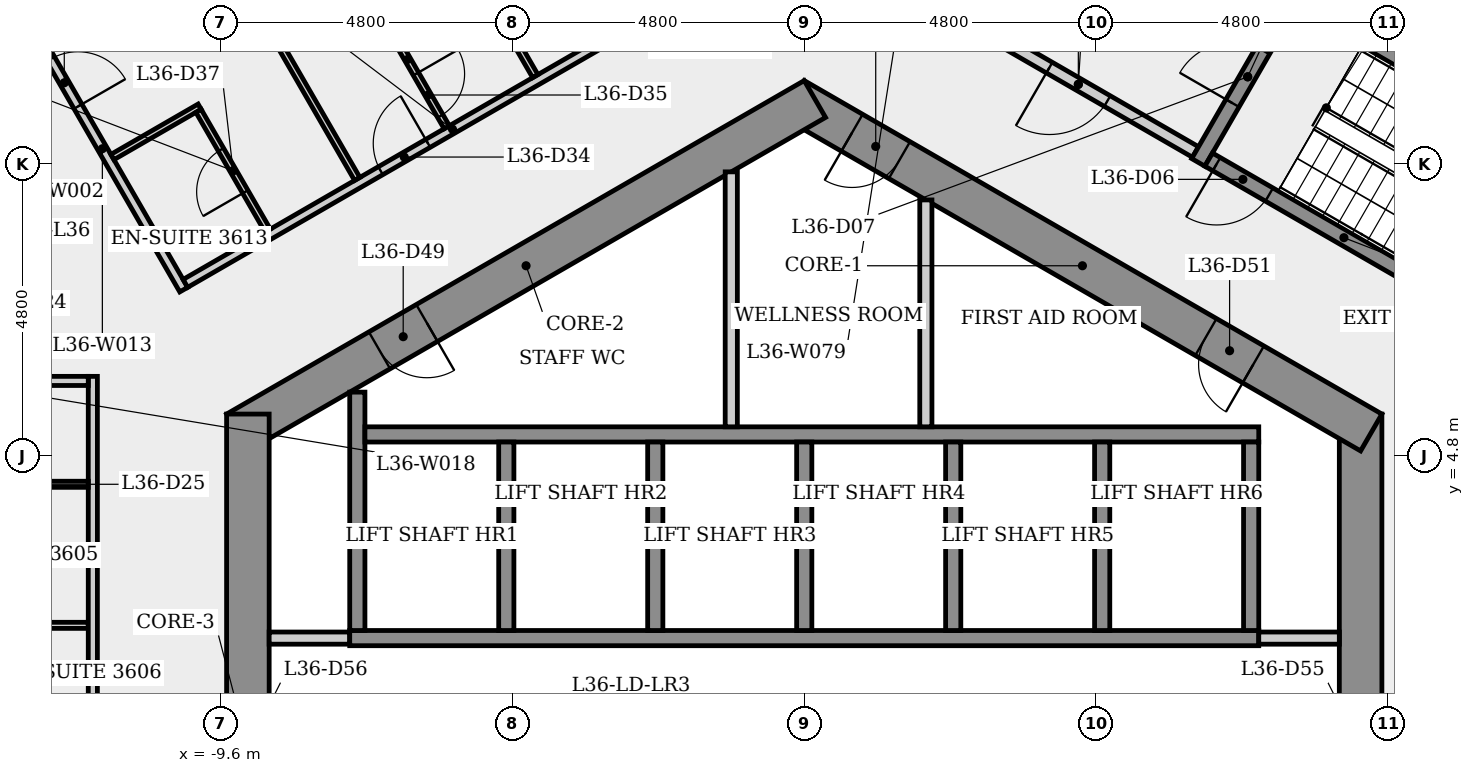
"""IFC4 building model, lengths in metres.
Left out: names, types, materials, properties, quantities, classifications, styles, units other than length and angle.
Written with IfcOpenShell. Run it as: python <this file> out.ifc"""

import sys

from ifc_helpers import new_model, si_unit, direction, frame, frame_2d, origin, place, context, subcontext, project, spatial, rectangle, extrude, element, fill, save


model = new_model("IFC4")
c1 = context("Model", 3, precision=1e-05, world=origin(), true_north=direction((0.0, 1.0)))
c2 = subcontext(c1, "Body", "Model", "MODEL_VIEW")
j1 = project(units=[si_unit("LENGTHUNIT", "METRE"), si_unit("PLANEANGLEUNIT", "RADIAN")], contexts=[c1])
p1 = place(None, origin())
s1 = spatial("IfcSite", under=j1, at=p1, CompositionType="ELEMENT")
p2 = place(p1, origin())
s2 = spatial("IfcBuilding", under=s1, at=p2, CompositionType="ELEMENT")
p3 = place(p2, frame((0.0, 0.0, 135.9)))
s3 = spatial("IfcBuildingStorey", under=s2, at=p3, CompositionType="ELEMENT", Elevation=135.9)
p4 = place(p3, frame((9.15, -5.485, 0.0), z_axis=(0.0, 0.0, 1.0), x_axis=(0.0, 1.0, 0.0)))
e1 = element("IfcWall", 1, at=p4, inside=s3, PredefinedType="SHEAR", context=c2, shape_type="SweptSolid", body=[
    extrude(rectangle(XDim=10.97, YDim=0.7, at=frame_2d((5.485, 0.0))), origin(), (0.0, 0.0, 1.0), 4.0),
])
p5 = place(p4, frame((4.685, 0.0, 0.0)))
e2 = element("IfcOpeningElement", 2, at=p5, cuts=e1, PredefinedType="OPENING", context=c2, shape_type="SweptSolid", body=[
    extrude(rectangle(XDim=1.6, YDim=2.1, at=frame_2d((0.8, 1.05))), frame((0.0, 0.36, 0.0), z_axis=(0.0, -1.0, 0.0), x_axis=(1.0, 0.0, 0.0)), (0.0, 0.0, 1.0), 0.72),
])
p6 = place(p3, frame((9.325, 5.182, 0.0), z_axis=(0.0, 0.0, 1.0), x_axis=(-0.866023993627, 0.500002442456, 0.0)))
e3 = element("IfcWall", 3, at=p6, inside=s3, PredefinedType="SHEAR", context=c2, shape_type="SweptSolid", body=[
    extrude(rectangle(XDim=10.97, YDim=0.7, at=frame_2d((5.485, 0.0))), origin(), (0.0, 0.0, 1.0), 4.0),
])
p7 = place(p6, frame((8.96, 0.0, 0.0)))
e4 = element("IfcOpeningElement", 4, at=p7, cuts=e3, PredefinedType="OPENING", context=c2, shape_type="SweptSolid", body=[
    extrude(rectangle(XDim=0.9, YDim=2.1, at=frame_2d((0.45, 1.05))), frame((0.0, 0.36, 0.0), z_axis=(0.0, -1.0, 0.0), x_axis=(1.0, 0.0, 0.0)), (0.0, 0.0, 1.0), 0.72),
])
p8 = place(p6, frame((2.24, 0.0, 0.0)))
e5 = element("IfcOpeningElement", 5, at=p8, cuts=e3, PredefinedType="OPENING", context=c2, shape_type="SweptSolid", body=[
    extrude(rectangle(XDim=0.9, YDim=2.1, at=frame_2d((0.45, 1.05))), frame((0.0, 0.36, 0.0), z_axis=(0.0, -1.0, 0.0), x_axis=(1.0, 0.0, 0.0)), (0.0, 0.0, 1.0), 0.72),
])
p9 = place(p3, frame((0.175, 10.667, 0.0), z_axis=(0.0, 0.0, 1.0), x_axis=(-0.866023993627, -0.500002442456, 0.0)))
e6 = element("IfcWall", 6, at=p9, inside=s3, PredefinedType="SHEAR", context=c2, shape_type="SweptSolid", body=[
    extrude(rectangle(XDim=10.97, YDim=0.7, at=frame_2d((5.485, 0.0))), origin(), (0.0, 0.0, 1.0), 4.0),
])
p10 = place(p9, frame((7.368, 0.0, 0.0)))
e7 = element("IfcOpeningElement", 7, at=p10, cuts=e6, PredefinedType="OPENING", context=c2, shape_type="SweptSolid", body=[
    extrude(rectangle(XDim=0.9, YDim=2.1, at=frame_2d((0.45, 1.05))), frame((0.0, 0.36, 0.0), z_axis=(0.0, -1.0, 0.0), x_axis=(1.0, 0.0, 0.0)), (0.0, 0.0, 1.0), 0.72),
])
p11 = place(p3, frame((-9.15, 5.485, 0.0), z_axis=(0.0, 0.0, 1.0), x_axis=(0.0, -1.0, 0.0)))
e8 = element("IfcWall", 8, at=p11, inside=s3, PredefinedType="SHEAR", context=c2, shape_type="SweptSolid", body=[
    extrude(rectangle(XDim=10.97, YDim=0.7, at=frame_2d((5.485, 0.0))), origin(), (0.0, 0.0, 1.0), 4.0),
])
p12 = place(p11, frame((4.685, 0.0, 0.0)))
e9 = element("IfcOpeningElement", 9, at=p12, cuts=e8, PredefinedType="OPENING", context=c2, shape_type="SweptSolid", body=[
    extrude(rectangle(XDim=1.6, YDim=2.1, at=frame_2d((0.8, 1.05))), frame((0.0, 0.36, 0.0), z_axis=(0.0, -1.0, 0.0), x_axis=(1.0, 0.0, 0.0)), (0.0, 0.0, 1.0), 0.72),
])
p13 = place(p3, frame((-18.564, 2.01, 0.0), z_axis=(0.0, 0.0, 1.0), x_axis=(1.0, 0.0, 0.0)))
e10 = element("IfcWall", 10, at=p13, inside=s3, PredefinedType="PARTITIONING", context=c2, shape_type="SweptSolid", body=[
    extrude(rectangle(XDim=6.789, YDim=0.1, at=frame_2d((3.395, 0.0))), origin(), (0.0, 0.0, 1.0), 3.6),
])
p14 = place(p3, frame((-12.881, 12.167, 0.0), z_axis=(0.0, 0.0, 1.0), x_axis=(0.500034386872, -0.866005549604, 0.0)))
e11 = element("IfcWall", 11, at=p14, inside=s3, PredefinedType="PARTITIONING", context=c2, shape_type="SweptSolid", body=[
    extrude(rectangle(XDim=5.352, YDim=0.15, at=frame_2d((2.676, 0.0))), origin(), (0.0, 0.0, 1.0), 3.6),
])
p15 = place(p14, frame((0.974, 0.0, 0.0)))
e12 = element("IfcOpeningElement", 12, at=p15, cuts=e11, PredefinedType="OPENING", context=c2, shape_type="SweptSolid", body=[
    extrude(rectangle(XDim=0.9, YDim=2.1, at=frame_2d((0.45, 1.05))), frame((0.0, 0.085, 0.0), z_axis=(0.0, -1.0, 0.0), x_axis=(1.0, 0.0, 0.0)), (0.0, 0.0, 1.0), 0.17),
])
p16 = place(p3, frame((-11.7, 6.105, 0.0), z_axis=(0.0, 0.0, 1.0), x_axis=(0.0, -1.0, 0.0)))
e13 = element("IfcWall", 13, at=p16, inside=s3, PredefinedType="PARTITIONING", context=c2, shape_type="SweptSolid", body=[
    extrude(rectangle(XDim=12.135, YDim=0.15, at=frame_2d((6.067, 0.0))), origin(), (0.0, 0.0, 1.0), 3.6),
])
p17 = place(p16, frame((6.815, 0.0, 0.0)))
e14 = element("IfcOpeningElement", 14, at=p17, cuts=e13, PredefinedType="OPENING", context=c2, shape_type="SweptSolid", body=[
    extrude(rectangle(XDim=0.9, YDim=2.1, at=frame_2d((0.45, 1.05))), frame((0.0, 0.085, 0.0), z_axis=(0.0, -1.0, 0.0), x_axis=(1.0, 0.0, 0.0)), (0.0, 0.0, 1.0), 0.17),
])
p18 = place(p3, frame((-11.775, 4.33, 0.0), z_axis=(0.0, 0.0, 1.0), x_axis=(-1.0, 0.0, 0.0)))
e15 = element("IfcWall", 15, at=p18, inside=s3, PredefinedType="PARTITIONING", context=c2, shape_type="SweptSolid", body=[
    extrude(rectangle(XDim=2.275, YDim=0.1, at=frame_2d((1.138, 0.0))), origin(), (0.0, 0.0, 1.0), 3.6),
])
p19 = place(p18, frame((0.738, 0.0, 0.0)))
e16 = element("IfcOpeningElement", 16, at=p19, cuts=e15, PredefinedType="OPENING", context=c2, shape_type="SweptSolid", body=[
    extrude(rectangle(XDim=0.8, YDim=2.1, at=frame_2d((0.4, 1.05))), frame((0.0, 0.06, 0.0), z_axis=(0.0, -1.0, 0.0), x_axis=(1.0, 0.0, 0.0)), (0.0, 0.0, 1.0), 0.12),
])
p20 = place(p3, frame((-11.775, 6.03, 0.0), z_axis=(0.0, 0.0, 1.0), x_axis=(-1.0, 0.0, 0.0)))
e17 = element("IfcWall", 17, at=p20, inside=s3, PredefinedType="PARTITIONING", context=c2, shape_type="SweptSolid", body=[
    extrude(rectangle(XDim=4.649, YDim=0.15, at=frame_2d((2.325, 0.0))), origin(), (0.0, 0.0, 1.0), 3.6),
])
p21 = place(p20, frame((1.875, 0.0, 0.0)))
e18 = element("IfcOpeningElement", 18, at=p21, cuts=e17, PredefinedType="OPENING", context=c2, shape_type="SweptSolid", body=[
    extrude(rectangle(XDim=0.9, YDim=2.1, at=frame_2d((0.45, 1.05))), frame((0.0, 0.085, 0.0), z_axis=(0.0, -1.0, 0.0), x_axis=(1.0, 0.0, 0.0)), (0.0, 0.0, 1.0), 0.17),
])
p22 = place(p3, frame((-10.178, 7.634, 0.0), z_axis=(0.0, 0.0, 1.0), x_axis=(0.866024876865, 0.500000912651, 0.0)))
e19 = element("IfcWall", 19, at=p22, inside=s3, PredefinedType="PARTITIONING", context=c2, shape_type="SweptSolid", body=[
    extrude(rectangle(XDim=10.145, YDim=0.15, at=frame_2d((5.072, 0.0))), origin(), (0.0, 0.0, 1.0), 3.6),
])
p23 = place(p22, frame((3.707, 0.0, 0.0)))
e20 = element("IfcOpeningElement", 20, at=p23, cuts=e19, PredefinedType="OPENING", context=c2, shape_type="SweptSolid", body=[
    extrude(rectangle(XDim=0.9, YDim=2.1, at=frame_2d((0.45, 1.05))), frame((0.0, 0.085, 0.0), z_axis=(0.0, -1.0, 0.0), x_axis=(1.0, 0.0, 0.0)), (0.0, 0.0, 1.0), 0.17),
])
p24 = place(p3, frame((-9.943, 10.541, 0.0), z_axis=(0.0, 0.0, 1.0), x_axis=(-0.866057962423, -0.499943602543, 0.0)))
e21 = element("IfcWall", 21, at=p24, inside=s3, PredefinedType="PARTITIONING", context=c2, shape_type="SweptSolid", body=[
    extrude(rectangle(XDim=1.656, YDim=0.1, at=frame_2d((0.828, 0.0))), origin(), (0.0, 0.0, 1.0), 3.6),
])
p25 = place(p3, frame((-8.8, 1.8, 0.0), z_axis=(0.0, 0.0, 1.0), x_axis=(1.0, 0.0, 0.0)))
e22 = element("IfcWall", 22, at=p25, inside=s3, PredefinedType="PARTITIONING", context=c2, shape_type="SweptSolid", body=[
    extrude(rectangle(XDim=1.325, YDim=0.2, at=frame_2d((0.663, 0.0))), origin(), (0.0, 0.0, 1.0), 3.6),
])
p26 = place(p3, frame((-8.824, 8.502, 0.0), z_axis=(0.0, 0.0, 1.0), x_axis=(-0.499982560684, 0.866035472144, 0.0)))
e23 = element("IfcWall", 23, at=p26, inside=s3, PredefinedType="PARTITIONING", context=c2, shape_type="SweptSolid", body=[
    extrude(rectangle(XDim=2.275, YDim=0.1, at=frame_2d((1.137, 0.0))), origin(), (0.0, 0.0, 1.0), 3.6),
])
p27 = place(p26, frame((0.738, 0.0, 0.0)))
e24 = element("IfcOpeningElement", 24, at=p27, cuts=e23, PredefinedType="OPENING", context=c2, shape_type="SweptSolid", body=[
    extrude(rectangle(XDim=0.8, YDim=2.1, at=frame_2d((0.4, 1.05))), frame((0.0, 0.06, 0.0), z_axis=(0.0, -1.0, 0.0), x_axis=(1.0, 0.0, 0.0)), (0.0, 0.0, 1.0), 0.12),
])
p28 = place(p3, frame((-7.475, 1.8, 0.0), z_axis=(0.0, 0.0, 1.0), x_axis=(1.0, 0.0, 0.0)))
e25 = element("IfcWall", 25, at=p28, inside=s3, PredefinedType="SHEAR", context=c2, shape_type="SweptSolid", body=[
    extrude(rectangle(XDim=14.95, YDim=0.25, at=frame_2d((7.475, 0.0))), origin(), (0.0, 0.0, 1.0), 3.6),
])
p29 = place(p3, frame((-7.35, 1.925, 0.0), z_axis=(0.0, 0.0, 1.0), x_axis=(0.0, 1.0, 0.0)))
e26 = element("IfcWall", 26, at=p29, inside=s3, PredefinedType="SHEAR", context=c2, shape_type="SweptSolid", body=[
    extrude(rectangle(XDim=3.921, YDim=0.25, at=frame_2d((1.96, 0.0))), origin(), (0.0, 0.0, 1.0), 3.6),
])
p30 = place(p3, frame((-7.225, 5.15, 0.0), z_axis=(0.0, 0.0, 1.0), x_axis=(1.0, 0.0, 0.0)))
e27 = element("IfcWall", 27, at=p30, inside=s3, PredefinedType="SHEAR", context=c2, shape_type="SweptSolid", body=[
    extrude(rectangle(XDim=14.7, YDim=0.25, at=frame_2d((7.35, 0.0))), origin(), (0.0, 0.0, 1.0), 3.6),
])
p31 = place(p3, frame((-7.352, 9.352, 0.0), z_axis=(0.0, 0.0, 1.0), x_axis=(-0.499997453958, 0.866026873738, 0.0)))
e28 = element("IfcWall", 28, at=p31, inside=s3, PredefinedType="PARTITIONING", context=c2, shape_type="SweptSolid", body=[
    extrude(rectangle(XDim=7.71, YDim=0.1, at=frame_2d((3.855, 0.0))), origin(), (0.0, 0.0, 1.0), 3.6),
])
p32 = place(p3, frame((-7.167, 12.432, 0.0), z_axis=(0.0, 0.0, 1.0), x_axis=(0.500034319456, -0.866005588531, 0.0)))
e29 = element("IfcWall", 29, at=p32, inside=s3, PredefinedType="PARTITIONING", context=c2, shape_type="SweptSolid", body=[
    extrude(rectangle(XDim=2.575, YDim=0.1, at=frame_2d((1.288, 0.0))), origin(), (0.0, 0.0, 1.0), 3.6),
])
p33 = place(p32, frame((1.562, 0.0, 0.0)))
e30 = element("IfcOpeningElement", 30, at=p33, cuts=e29, PredefinedType="OPENING", context=c2, shape_type="SweptSolid", body=[
    extrude(rectangle(XDim=0.8, YDim=2.1, at=frame_2d((0.4, 1.05))), frame((0.0, 0.06, 0.0), z_axis=(0.0, -1.0, 0.0), x_axis=(1.0, 0.0, 0.0)), (0.0, 0.0, 1.0), 0.12),
])
p34 = place(p3, frame((-4.9, 5.025, 0.0), z_axis=(0.0, 0.0, 1.0), x_axis=(0.0, -1.0, 0.0)))
e31 = element("IfcWall", 31, at=p34, inside=s3, PredefinedType="SHEAR", context=c2, shape_type="SweptSolid", body=[
    extrude(rectangle(XDim=3.1, YDim=0.25, at=frame_2d((1.55, 0.0))), origin(), (0.0, 0.0, 1.0), 4.0),
])
p35 = place(p3, frame((-4.423, 11.043, 0.0), z_axis=(0.0, 0.0, 1.0), x_axis=(-0.499983743644, 0.866034789193, 0.0)))
e32 = element("IfcWall", 32, at=p35, inside=s3, PredefinedType="PARTITIONING", context=c2, shape_type="SweptSolid", body=[
    extrude(rectangle(XDim=7.711, YDim=0.1, at=frame_2d((3.855, 0.0))), origin(), (0.0, 0.0, 1.0), 3.6),
])
p36 = place(p3, frame((-2.45, 5.025, 0.0), z_axis=(0.0, 0.0, 1.0), x_axis=(0.0, -1.0, 0.0)))
e33 = element("IfcWall", 33, at=p36, inside=s3, PredefinedType="SHEAR", context=c2, shape_type="SweptSolid", body=[
    extrude(rectangle(XDim=3.1, YDim=0.25, at=frame_2d((1.55, 0.0))), origin(), (0.0, 0.0, 1.0), 4.0),
])
p37 = place(p3, frame((-1.2, 9.469, 0.0), z_axis=(0.0, 0.0, 1.0), x_axis=(0.0, -1.0, 0.0)))
e34 = element("IfcWall", 34, at=p37, inside=s3, PredefinedType="PARTITIONING", context=c2, shape_type="SweptSolid", body=[
    extrude(rectangle(XDim=4.194, YDim=0.2, at=frame_2d((2.097, 0.0))), origin(), (0.0, 0.0, 1.0), 3.6),
])
p38 = place(p3, frame((0.0, 5.025, 0.0), z_axis=(0.0, 0.0, 1.0), x_axis=(0.0, -1.0, 0.0)))
e35 = element("IfcWall", 35, at=p38, inside=s3, PredefinedType="SHEAR", context=c2, shape_type="SweptSolid", body=[
    extrude(rectangle(XDim=3.1, YDim=0.25, at=frame_2d((1.55, 0.0))), origin(), (0.0, 0.0, 1.0), 4.0),
])
p39 = place(p3, frame((2.0, 9.007, 0.0), z_axis=(0.0, 0.0, 1.0), x_axis=(0.0, -1.0, 0.0)))
e36 = element("IfcWall", 36, at=p39, inside=s3, PredefinedType="PARTITIONING", context=c2, shape_type="SweptSolid", body=[
    extrude(rectangle(XDim=3.732, YDim=0.2, at=frame_2d((1.866, 0.0))), origin(), (0.0, 0.0, 1.0), 3.6),
])
for number, where, z_axis, x_axis in (
    (37, (2.45, 5.025, 0.0), (0.0, 0.0, 1.0), (0.0, -1.0, 0.0)),
    (38, (4.9, 5.025, 0.0), (0.0, 0.0, 1.0), (0.0, -1.0, 0.0)),
):
    element("IfcWall", number, at=place(p3, frame(where, z_axis=z_axis, x_axis=x_axis)), inside=s3, PredefinedType="SHEAR", context=c2, shape_type="SweptSolid", body=[
        extrude(rectangle(XDim=3.1, YDim=0.25, at=frame_2d((1.55, 0.0))), origin(), (0.0, 0.0, 1.0), 4.0),
    ])
p40 = place(p3, frame((6.435, 9.795, 0.0), z_axis=(0.0, 0.0, 1.0), x_axis=(-0.866012907634, 0.500021643343, 0.0)))
e39 = element("IfcWall", 39, at=p40, inside=s3, PredefinedType="PARTITIONING", context=c2, shape_type="SweptSolid", body=[
    extrude(rectangle(XDim=4.45, YDim=0.2, at=frame_2d((2.225, 0.0))), origin(), (0.0, 0.0, 1.0), 3.6),
])
p41 = place(p40, frame((1.675, 0.0, 0.0)))
e40 = element("IfcOpeningElement", 40, at=p41, cuts=e39, PredefinedType="OPENING", context=c2, shape_type="SweptSolid", body=[
    extrude(rectangle(XDim=1.1, YDim=2.1, at=frame_2d((0.55, 1.05))), frame((0.0, 0.11, 0.0), z_axis=(0.0, -1.0, 0.0), x_axis=(1.0, 0.0, 0.0)), (0.0, 0.0, 1.0), 0.22),
])
p42 = place(p3, frame((6.48, 9.624, 0.0), z_axis=(0.0, 0.0, 1.0), x_axis=(0.500017246033, 0.866015446554, 0.0)))
e41 = element("IfcWall", 41, at=p42, inside=s3, PredefinedType="SHEAR", context=c2, shape_type="SweptSolid", body=[
    extrude(rectangle(XDim=3.25, YDim=0.25, at=frame_2d((1.625, 0.0))), origin(), (0.0, 0.0, 1.0), 3.6),
])
p43 = place(p42, frame((1.125, 0.0, 0.0)))
e42 = element("IfcOpeningElement", 42, at=p43, cuts=e41, PredefinedType="OPENING", context=c2, shape_type="SweptSolid", body=[
    extrude(rectangle(XDim=1.0, YDim=2.1, at=frame_2d((0.5, 1.05))), frame((0.0, 0.135, 0.0), z_axis=(0.0, -1.0, 0.0), x_axis=(1.0, 0.0, 0.0)), (0.0, 0.0, 1.0), 0.27),
])
p44 = place(p3, frame((7.475, 1.8, 0.0), z_axis=(0.0, 0.0, 1.0), x_axis=(1.0, 0.0, 0.0)))
e43 = element("IfcWall", 43, at=p44, inside=s3, PredefinedType="PARTITIONING", context=c2, shape_type="SweptSolid", body=[
    extrude(rectangle(XDim=1.325, YDim=0.2, at=frame_2d((0.663, 0.0))), origin(), (0.0, 0.0, 1.0), 3.6),
])
p45 = place(p3, frame((7.35, 5.025, 0.0), z_axis=(0.0, 0.0, 1.0), x_axis=(0.0, -1.0, 0.0)))
e44 = element("IfcWall", 44, at=p45, inside=s3, PredefinedType="SHEAR", context=c2, shape_type="SweptSolid", body=[
    extrude(rectangle(XDim=3.1, YDim=0.25, at=frame_2d((1.55, 0.0))), origin(), (0.0, 0.0, 1.0), 4.0),
])
p46 = place(p3, frame((8.151, 12.268, 0.0), z_axis=(0.0, 0.0, 1.0), x_axis=(0.866025499775, -0.499999833739, 0.0)))
e45 = element("IfcWall", 45, at=p46, inside=s3, PredefinedType="SHEAR", context=c2, shape_type="SweptSolid", body=[
    extrude(rectangle(XDim=6.4, YDim=0.25, at=frame_2d((3.2, 0.0))), origin(), (0.0, 0.0, 1.0), 3.6),
])
p47 = place(p3, frame((11.1, 7.101, 0.0), z_axis=(0.0, 0.0, 1.0), x_axis=(-0.8660265141, 0.499998076872, 0.0)))
e46 = element("IfcWall", 46, at=p47, inside=s3, PredefinedType="SHEAR", context=c2, shape_type="SweptSolid", body=[
    extrude(rectangle(XDim=5.137, YDim=0.25, at=frame_2d((2.569, 0.0))), origin(), (0.0, 0.0, 1.0), 3.6),
])
p48 = place(p47, frame((3.987, 0.0, 0.0)))
e47 = element("IfcOpeningElement", 47, at=p48, cuts=e46, PredefinedType="OPENING", context=c2, shape_type="SweptSolid", body=[
    extrude(rectangle(XDim=1.0, YDim=2.1, at=frame_2d((0.5, 1.05))), frame((0.0, 0.135, 0.0), z_axis=(0.0, -1.0, 0.0), x_axis=(1.0, 0.0, 0.0)), (0.0, 0.0, 1.0), 0.27),
])
p49 = place(p48, origin())
e48 = element("IfcDoor", 48, at=p49, inside=s3, OperationType="SINGLE_SWING_RIGHT", PredefinedType="DOOR", context=c2, shape_type="SweptSolid", body=[
    extrude(rectangle(XDim=1.0, YDim=2.1, at=frame_2d((0.5, 1.05))), frame((0.0, 0.025, 0.0), z_axis=(0.0, -1.0, 0.0), x_axis=(1.0, 0.0, 0.0)), (0.0, 0.0, 1.0), 0.05),
])
fill(e47, e48)
p50 = place(p43, origin())
e49 = element("IfcDoor", 49, at=p50, inside=s3, OperationType="SINGLE_SWING_LEFT", PredefinedType="DOOR", context=c2, shape_type="SweptSolid", body=[
    extrude(rectangle(XDim=1.0, YDim=2.1, at=frame_2d((0.5, 1.05))), frame((0.0, 0.025, 0.0), z_axis=(0.0, -1.0, 0.0), x_axis=(1.0, 0.0, 0.0)), (0.0, 0.0, 1.0), 0.05),
])
fill(e42, e49)
p51 = place(p41, origin())
e50 = element("IfcDoor", 50, at=p51, inside=s3, OperationType="SINGLE_SWING_RIGHT", PredefinedType="DOOR", context=c2, shape_type="SweptSolid", body=[
    extrude(rectangle(XDim=1.1, YDim=2.1, at=frame_2d((0.55, 1.05))), frame((0.0, 0.025, 0.0), z_axis=(0.0, -1.0, 0.0), x_axis=(1.0, 0.0, 0.0)), (0.0, 0.0, 1.0), 0.05),
])
fill(e40, e50)
p52 = place(p23, origin())
e51 = element("IfcDoor", 51, at=p52, inside=s3, OperationType="SINGLE_SWING_RIGHT", PredefinedType="DOOR", context=c2, shape_type="SweptSolid", body=[
    extrude(rectangle(XDim=0.9, YDim=2.1, at=frame_2d((0.45, 1.05))), frame((0.0, 0.025, 0.0), z_axis=(0.0, -1.0, 0.0), x_axis=(1.0, 0.0, 0.0)), (0.0, 0.0, 1.0), 0.05),
])
fill(e20, e51)
p53 = place(p33, origin())
e52 = element("IfcDoor", 52, at=p53, inside=s3, OperationType="SINGLE_SWING_LEFT", PredefinedType="DOOR", context=c2, shape_type="SweptSolid", body=[
    extrude(rectangle(XDim=0.8, YDim=2.1, at=frame_2d((0.4, 1.05))), frame((0.0, 0.025, 0.0), z_axis=(0.0, -1.0, 0.0), x_axis=(1.0, 0.0, 0.0)), (0.0, 0.0, 1.0), 0.05),
])
fill(e30, e52)
p54 = place(p15, origin())
e53 = element("IfcDoor", 53, at=p54, inside=s3, OperationType="SINGLE_SWING_RIGHT", PredefinedType="DOOR", context=c2, shape_type="SweptSolid", body=[
    extrude(rectangle(XDim=0.9, YDim=2.1, at=frame_2d((0.45, 1.05))), frame((0.0, 0.025, 0.0), z_axis=(0.0, -1.0, 0.0), x_axis=(1.0, 0.0, 0.0)), (0.0, 0.0, 1.0), 0.05),
])
fill(e12, e53)
p55 = place(p27, origin())
e54 = element("IfcDoor", 54, at=p55, inside=s3, OperationType="SINGLE_SWING_LEFT", PredefinedType="DOOR", context=c2, shape_type="SweptSolid", body=[
    extrude(rectangle(XDim=0.8, YDim=2.1, at=frame_2d((0.4, 1.05))), frame((0.0, 0.025, 0.0), z_axis=(0.0, -1.0, 0.0), x_axis=(1.0, 0.0, 0.0)), (0.0, 0.0, 1.0), 0.05),
])
fill(e24, e54)
p56 = place(p10, origin())
e55 = element("IfcDoor", 55, at=p56, inside=s3, OperationType="SINGLE_SWING_LEFT", PredefinedType="DOOR", context=c2, shape_type="SweptSolid", body=[
    extrude(rectangle(XDim=0.9, YDim=2.1, at=frame_2d((0.45, 1.05))), frame((0.0, 0.025, 0.0), z_axis=(0.0, -1.0, 0.0), x_axis=(1.0, 0.0, 0.0)), (0.0, 0.0, 1.0), 0.05),
])
fill(e7, e55)
p57 = place(p7, origin())
e56 = element("IfcDoor", 56, at=p57, inside=s3, OperationType="SINGLE_SWING_RIGHT", PredefinedType="DOOR", context=c2, shape_type="SweptSolid", body=[
    extrude(rectangle(XDim=0.9, YDim=2.1, at=frame_2d((0.45, 1.05))), frame((0.0, 0.025, 0.0), z_axis=(0.0, -1.0, 0.0), x_axis=(1.0, 0.0, 0.0)), (0.0, 0.0, 1.0), 0.05),
])
fill(e4, e56)
p58 = place(p8, origin())
e57 = element("IfcDoor", 57, at=p58, inside=s3, OperationType="SINGLE_SWING_LEFT", PredefinedType="DOOR", context=c2, shape_type="SweptSolid", body=[
    extrude(rectangle(XDim=0.9, YDim=2.1, at=frame_2d((0.45, 1.05))), frame((0.0, 0.025, 0.0), z_axis=(0.0, -1.0, 0.0), x_axis=(1.0, 0.0, 0.0)), (0.0, 0.0, 1.0), 0.05),
])
fill(e5, e57)
save(model, sys.argv[1])
